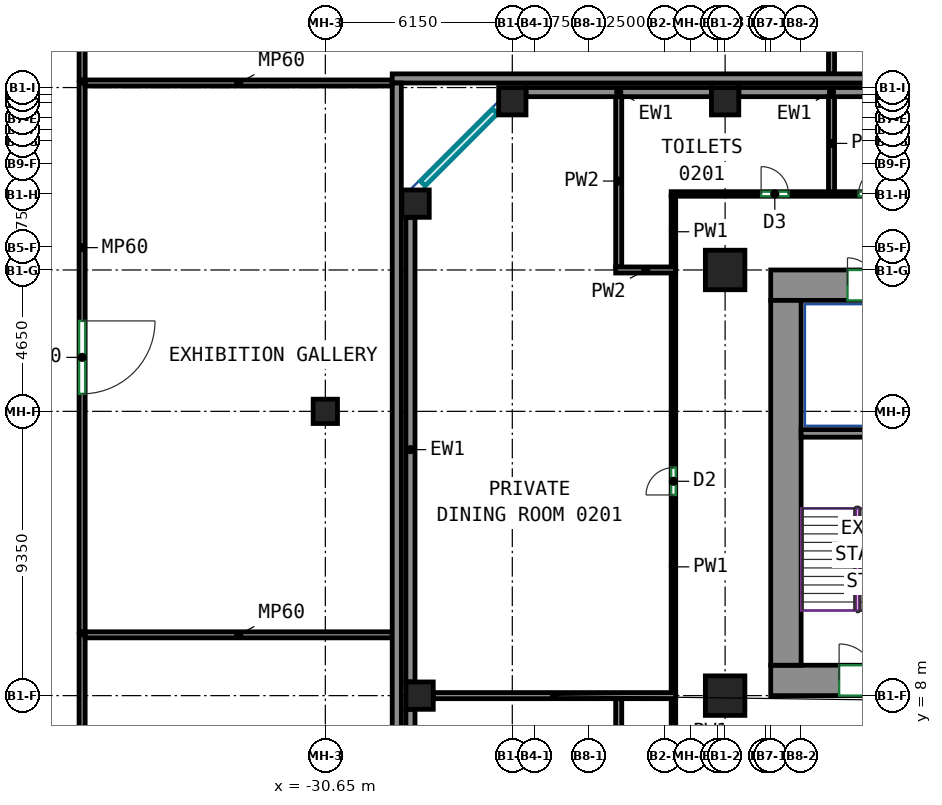
"""IFC4 building model, lengths in metres.
Left out: names, types, materials, properties, quantities, classifications, styles, units other than length and angle.
Written with IfcOpenShell. Run it as: python <this file> out.ifc"""

import sys

from ifc_helpers import new_model, si_unit, direction, frame, frame_2d, origin, origin_2d, place, context, subcontext, project, spatial, rectangle, extrude, source, transform, mapped, element, fill, save


model = new_model("IFC4")
c1 = context("Model", 3, precision=1e-05, world=origin(), true_north=direction((0.0, 1.0)))
c2 = subcontext(c1, "Body", "Model", "MODEL_VIEW")
j1 = project(units=[si_unit("LENGTHUNIT", "METRE"), si_unit("PLANEANGLEUNIT", "RADIAN")], contexts=[c1])
p1 = place(None, origin())
s1 = spatial("IfcSite", under=j1, at=p1, CompositionType="ELEMENT")
p2 = place(p1, origin())
s2 = spatial("IfcBuilding", under=s1, at=p2, CompositionType="ELEMENT")
p3 = place(p2, frame((0.0, 0.0, 13.5)))
s3 = spatial("IfcBuildingStorey", under=s2, at=p3, CompositionType="ELEMENT", Elevation=13.5)
m1 = source(origin(), c2, "Body", "SweptSolid", [
    extrude(rectangle(XDim=0.9, YDim=0.9, at=origin_2d()), origin(), (0.0, 0.0, 1.0), 4.1),
])
for number, where, z_axis, x_axis in (
    (1, (-27.682, 24.182, 0.0), (0.0, 0.0, 1.0), (1.0, 0.0, 0.0)),
    (2, (-27.55, 8.0, 0.0), (0.0, 0.0, 1.0), (1.0, 0.0, 0.0)),
    (3, (-24.5, 27.55, 0.0), (0.0, 0.0, 1.0), (1.0, 0.0, 0.0)),
):
    element("IfcColumn", number, at=place(p3, frame(where, z_axis=z_axis, x_axis=x_axis)), inside=s3, PredefinedType="COLUMN", context=c2, shape_type="MappedRepresentation", body=[
        mapped(m1, transform((0.0, 0.0, 0.0))),
    ])
m2 = source(origin(), c2, "Body", "SweptSolid", [
    extrude(rectangle(XDim=1.3, YDim=1.3, at=origin_2d()), origin(), (0.0, 0.0, 1.0), 4.1),
])
for number, where, z_axis, x_axis in (
    (4, (-17.5, 8.0, 0.0), (0.0, 0.0, 1.0), (1.0, 0.0, 0.0)),
    (5, (-17.5, 22.0, 0.0), (0.0, 0.0, 1.0), (1.0, 0.0, 0.0)),
):
    element("IfcColumn", number, at=place(p3, frame(where, z_axis=z_axis, x_axis=x_axis)), inside=s3, PredefinedType="COLUMN", context=c2, shape_type="MappedRepresentation", body=[
        mapped(m2, transform((0.0, 0.0, 0.0))),
    ])
p4 = place(p3, frame((-17.5, 27.55, 0.0), z_axis=(0.0, 0.0, 1.0), x_axis=(1.0, 0.0, 0.0)))
e6 = element("IfcColumn", 6, at=p4, inside=s3, PredefinedType="COLUMN", context=c2, shape_type="MappedRepresentation", body=[
    mapped(m1, transform((0.0, 0.0, 0.0))),
])
m3 = source(origin(), c2, "Body", "SweptSolid", [
    extrude(rectangle(XDim=5.63, YDim=1.0, at=frame_2d((2.815, 0.0))), origin(), (0.0, 0.0, 1.0), 4.1),
])
p5 = place(p3, frame((-16.0, 8.5, 0.0), z_axis=(0.0, 0.0, 1.0), x_axis=(1.0, 0.0, 0.0)))
e7 = element("IfcWall", 7, at=p5, inside=s3, PredefinedType="SHEAR", context=c2, shape_type="MappedRepresentation", body=[
    mapped(m3, transform((0.0, 0.0, 0.0))),
])
p6 = place(p5, frame((2.25, 0.0, 0.0)))
e8 = element("IfcOpeningElement", 8, at=p6, cuts=e7, PredefinedType="OPENING", context=c2, shape_type="SweptSolid", body=[
    extrude(rectangle(XDim=1.2, YDim=2.1, at=frame_2d((0.6, 1.05))), frame((0.0, 0.51, 0.0), z_axis=(0.0, -1.0, 0.0), x_axis=(1.0, 0.0, 0.0)), (0.0, 0.0, 1.0), 1.02),
])
m4 = source(origin(), c2, "Body", "SweptSolid", [
    extrude(rectangle(XDim=34.1, YDim=1.0, at=frame_2d((17.05, 0.0))), origin(), (0.0, 0.0, 1.0), 4.1),
])
p7 = place(p3, frame((-16.0, 21.5, 0.0), z_axis=(0.0, 0.0, 1.0), x_axis=(1.0, 0.0, 0.0)))
e9 = element("IfcWall", 9, at=p7, inside=s3, PredefinedType="SHEAR", context=c2, shape_type="MappedRepresentation", body=[
    mapped(m4, transform((0.0, 0.0, 0.0))),
])
p8 = place(p7, frame((6.108, 0.0, 0.0)))
e10 = element("IfcOpeningElement", 10, at=p8, cuts=e9, PredefinedType="OPENING", context=c2, shape_type="SweptSolid", body=[
    extrude(rectangle(XDim=0.9, YDim=2.1, at=frame_2d((0.45, 1.05))), frame((0.0, 0.51, 0.0), z_axis=(0.0, -1.0, 0.0), x_axis=(1.0, 0.0, 0.0)), (0.0, 0.0, 1.0), 1.02),
])
p9 = place(p7, frame((11.173, 0.0, 0.0)))
e11 = element("IfcOpeningElement", 11, at=p9, cuts=e9, PredefinedType="OPENING", context=c2, shape_type="SweptSolid", body=[
    extrude(rectangle(XDim=0.9, YDim=2.1, at=frame_2d((0.45, 1.05))), frame((0.0, 0.51, 0.0), z_axis=(0.0, -1.0, 0.0), x_axis=(1.0, 0.0, 0.0)), (0.0, 0.0, 1.0), 1.02),
])
p10 = place(p7, frame((16.238, 0.0, 0.0)))
e12 = element("IfcOpeningElement", 12, at=p10, cuts=e9, PredefinedType="OPENING", context=c2, shape_type="SweptSolid", body=[
    extrude(rectangle(XDim=0.9, YDim=2.1, at=frame_2d((0.45, 1.05))), frame((0.0, 0.51, 0.0), z_axis=(0.0, -1.0, 0.0), x_axis=(1.0, 0.0, 0.0)), (0.0, 0.0, 1.0), 1.02),
])
p11 = place(p7, frame((21.062, 0.0, 0.0)))
e13 = element("IfcOpeningElement", 13, at=p11, cuts=e9, PredefinedType="OPENING", context=c2, shape_type="SweptSolid", body=[
    extrude(rectangle(XDim=0.9, YDim=2.1, at=frame_2d((0.45, 1.05))), frame((0.0, 0.51, 0.0), z_axis=(0.0, -1.0, 0.0), x_axis=(1.0, 0.0, 0.0)), (0.0, 0.0, 1.0), 1.02),
])
p12 = place(p7, frame((26.489, 0.0, 0.0)))
e14 = element("IfcOpeningElement", 14, at=p12, cuts=e9, PredefinedType="OPENING", context=c2, shape_type="SweptSolid", body=[
    extrude(rectangle(XDim=0.9, YDim=2.1, at=frame_2d((0.45, 1.05))), frame((0.0, 0.51, 0.0), z_axis=(0.0, -1.0, 0.0), x_axis=(1.0, 0.0, 0.0)), (0.0, 0.0, 1.0), 1.02),
])
p13 = place(p7, frame((2.525, 0.0, 0.0)))
e15 = element("IfcOpeningElement", 15, at=p13, cuts=e9, PredefinedType="OPENING", context=c2, shape_type="SweptSolid", body=[
    extrude(rectangle(XDim=0.9, YDim=2.1, at=frame_2d((0.45, 1.05))), frame((0.0, 0.51, 0.0), z_axis=(0.0, -1.0, 0.0), x_axis=(1.0, 0.0, 0.0)), (0.0, 0.0, 1.0), 1.02),
])
p14 = place(p7, frame((30.675, 0.0, 0.0)))
e16 = element("IfcOpeningElement", 16, at=p14, cuts=e9, PredefinedType="OPENING", context=c2, shape_type="SweptSolid", body=[
    extrude(rectangle(XDim=0.9, YDim=2.1, at=frame_2d((0.45, 1.05))), frame((0.0, 0.51, 0.0), z_axis=(0.0, -1.0, 0.0), x_axis=(1.0, 0.0, 0.0)), (0.0, 0.0, 1.0), 1.02),
])
m5 = source(origin(), c2, "Body", "SweptSolid", [
    extrude(rectangle(XDim=12.0, YDim=1.0, at=frame_2d((6.0, 0.0))), origin(), (0.0, 0.0, 1.0), 4.1),
])
p15 = place(p3, frame((-15.5, 9.0, 0.0), z_axis=(0.0, 0.0, 1.0), x_axis=(0.0, 1.0, 0.0)))
e17 = element("IfcWall", 17, at=p15, inside=s3, PredefinedType="SHEAR", context=c2, shape_type="MappedRepresentation", body=[
    mapped(m5, transform((0.0, 0.0, 0.0))),
])
m6 = source(origin(), c2, "Body", "SweptSolid", [
    extrude(rectangle(XDim=3.7, YDim=0.25, at=frame_2d((1.85, 0.0))), origin(), (0.0, 0.0, 1.0), 4.1),
])
p16 = place(p3, frame((-15.0, 16.625, 0.0), z_axis=(0.0, 0.0, 1.0), x_axis=(1.0, 0.0, 0.0)))
e18 = element("IfcWall", 18, at=p16, inside=s3, PredefinedType="SHEAR", context=c2, shape_type="MappedRepresentation", body=[
    mapped(m6, transform((0.0, 0.0, 0.0))),
])
m7 = source(origin(), c2, "Body", "SweptSolid", [
    extrude(rectangle(XDim=0.8, YDim=0.8, at=origin_2d()), origin(), (0.0, 0.0, 1.0), 4.1),
])
p17 = place(p3, frame((-30.65, 17.35, 0.0), z_axis=(0.0, 0.0, 1.0), x_axis=(1.0, 0.0, 0.0)))
e19 = element("IfcColumn", 19, at=p17, inside=s3, PredefinedType="COLUMN", context=c2, shape_type="MappedRepresentation", body=[
    mapped(m7, transform((0.0, 0.0, 0.0))),
])
m8 = source(origin(), c2, "Body", "SweptSolid", [
    extrude(rectangle(XDim=6.1, YDim=0.3, at=frame_2d((3.05, 0.0))), origin(), (0.0, 0.0, 1.0), 4.1),
])
for number, where, z_axis, x_axis in (
    (20, (-10.95, 27.85, 0.0), (0.0, 0.0, 1.0), (-1.0, 0.0, 0.0)),
    (21, (-17.95, 27.85, 0.0), (0.0, 0.0, 1.0), (-1.0, 0.0, 0.0)),
):
    element("IfcWall", number, at=place(p3, frame(where, z_axis=z_axis, x_axis=x_axis)), inside=s3, PredefinedType="SOLIDWALL", context=c2, shape_type="MappedRepresentation", body=[
        mapped(m8, transform((0.0, 0.0, 0.0))),
    ])
m9 = source(origin(), c2, "Body", "SweptSolid", [
    extrude(rectangle(XDim=15.282, YDim=0.3, at=frame_2d((7.641, 0.0))), origin(), (0.0, 0.0, 1.0), 4.1),
])
p18 = place(p3, frame((-27.85, 23.732, 0.0), z_axis=(0.0, 0.0, 1.0), x_axis=(0.0, -1.0, 0.0)))
e22 = element("IfcWall", 22, at=p18, inside=s3, PredefinedType="SOLIDWALL", context=c2, shape_type="MappedRepresentation", body=[
    mapped(m9, transform((0.0, 0.0, 0.0))),
])
m10 = source(origin(), c2, "Body", "SweptSolid", [
    extrude(rectangle(XDim=8.1, YDim=0.3, at=frame_2d((4.05, 0.0))), origin(), (0.0, 0.0, 1.0), 4.1),
])
p19 = place(p3, frame((-27.85, 7.55, 0.0), z_axis=(0.0, 0.0, 1.0), x_axis=(0.0, -1.0, 0.0)))
e23 = element("IfcWall", 23, at=p19, inside=s3, PredefinedType="SOLIDWALL", context=c2, shape_type="MappedRepresentation", body=[
    mapped(m10, transform((0.0, 0.0, 0.0))),
])
m11 = source(origin(), c2, "Body", "SweptSolid", [
    extrude(rectangle(XDim=56.3, YDim=0.3, at=frame_2d((28.15, 0.0))), origin(), (0.0, 0.0, 1.0), 4.1),
])
p20 = place(p3, frame((27.85, 28.3, 0.0), z_axis=(0.0, 0.0, 1.0), x_axis=(-1.0, 0.0, 0.0)))
e24 = element("IfcWall", 24, at=p20, inside=s3, PredefinedType="SOLIDWALL", context=c2, shape_type="MappedRepresentation", body=[
    mapped(m11, transform((0.0, 0.0, 0.0))),
])
m12 = source(origin(), c2, "Body", "SweptSolid", [
    extrude(rectangle(XDim=56.3, YDim=0.3, at=frame_2d((28.15, 0.0))), origin(), (0.0, 0.0, 1.0), 4.1),
])
p21 = place(p3, frame((-28.3, 28.15, 0.0), z_axis=(0.0, 0.0, 1.0), x_axis=(0.0, -1.0, 0.0)))
e25 = element("IfcWall", 25, at=p21, inside=s3, PredefinedType="SOLIDWALL", context=c2, shape_type="MappedRepresentation", body=[
    mapped(m12, transform((0.0, 0.0, 0.0))),
])
p22 = place(p3, frame((-19.2, 8.09, 0.0), z_axis=(0.0, 0.0, 1.0), x_axis=(0.0, 1.0, 0.0)))
e26 = element("IfcWall", 26, at=p22, inside=s3, PredefinedType="PARTITIONING", context=c2, shape_type="SweptSolid", body=[
    extrude(rectangle(XDim=13.82, YDim=0.15, at=frame_2d((6.91, 0.0))), origin(), (0.0, 0.0, 1.0), 4.1),
])
p23 = place(p22, frame((6.51, 0.0, 0.0)))
e27 = element("IfcOpeningElement", 27, at=p23, cuts=e26, PredefinedType="OPENING", context=c2, shape_type="SweptSolid", body=[
    extrude(rectangle(XDim=0.9, YDim=2.1, at=frame_2d((0.45, 1.05))), frame((0.0, 0.085, 0.0), z_axis=(0.0, -1.0, 0.0), x_axis=(1.0, 0.0, 0.0)), (0.0, 0.0, 1.0), 0.17),
])
p24 = place(p3, frame((-19.2, 22.09, 0.0), z_axis=(0.0, 0.0, 1.0), x_axis=(0.0, 1.0, 0.0)))
e28 = element("IfcWall", 28, at=p24, inside=s3, PredefinedType="PARTITIONING", context=c2, shape_type="SweptSolid", body=[
    extrude(rectangle(XDim=2.335, YDim=0.15, at=frame_2d((1.167, 0.0))), origin(), (0.0, 0.0, 1.0), 4.1),
])
p25 = place(p3, frame((-19.275, 24.5, 0.0), z_axis=(0.0, 0.0, 1.0), x_axis=(1.0, 0.0, 0.0)))
e29 = element("IfcWall", 29, at=p25, inside=s3, PredefinedType="PARTITIONING", context=c2, shape_type="SweptSolid", body=[
    extrude(rectangle(XDim=40.35, YDim=0.15, at=frame_2d((20.175, 0.0))), origin(), (0.0, 0.0, 1.0), 3.45),
])
p26 = place(p25, frame((2.959, 0.0, 0.0)))
e30 = element("IfcOpeningElement", 30, at=p26, cuts=e29, PredefinedType="OPENING", context=c2, shape_type="SweptSolid", body=[
    extrude(rectangle(XDim=0.9, YDim=2.1, at=frame_2d((0.45, 1.05))), frame((0.0, 0.085, 0.0), z_axis=(0.0, -1.0, 0.0), x_axis=(1.0, 0.0, 0.0)), (0.0, 0.0, 1.0), 0.17),
])
p27 = place(p25, frame((6.167, 0.0, 0.0)))
e31 = element("IfcOpeningElement", 31, at=p27, cuts=e29, PredefinedType="OPENING", context=c2, shape_type="SweptSolid", body=[
    extrude(rectangle(XDim=0.9, YDim=2.1, at=frame_2d((0.45, 1.05))), frame((0.0, 0.085, 0.0), z_axis=(0.0, -1.0, 0.0), x_axis=(1.0, 0.0, 0.0)), (0.0, 0.0, 1.0), 0.17),
])
p28 = place(p25, frame((16.969, 0.0, 0.0)))
e32 = element("IfcOpeningElement", 32, at=p28, cuts=e29, PredefinedType="OPENING", context=c2, shape_type="SweptSolid", body=[
    extrude(rectangle(XDim=0.9, YDim=2.1, at=frame_2d((0.45, 1.05))), frame((0.0, 0.085, 0.0), z_axis=(0.0, -1.0, 0.0), x_axis=(1.0, 0.0, 0.0)), (0.0, 0.0, 1.0), 0.17),
])
p29 = place(p25, frame((24.268, 0.0, 0.0)))
e33 = element("IfcOpeningElement", 33, at=p29, cuts=e29, PredefinedType="OPENING", context=c2, shape_type="SweptSolid", body=[
    extrude(rectangle(XDim=0.9, YDim=2.1, at=frame_2d((0.45, 1.05))), frame((0.0, 0.085, 0.0), z_axis=(0.0, -1.0, 0.0), x_axis=(1.0, 0.0, 0.0)), (0.0, 0.0, 1.0), 0.17),
])
p30 = place(p25, frame((36.315, 0.0, 0.0)))
e34 = element("IfcOpeningElement", 34, at=p30, cuts=e29, PredefinedType="OPENING", context=c2, shape_type="SweptSolid", body=[
    extrude(rectangle(XDim=1.8, YDim=2.1, at=frame_2d((0.9, 1.05))), frame((0.0, 0.085, 0.0), z_axis=(0.0, -1.0, 0.0), x_axis=(1.0, 0.0, 0.0)), (0.0, 0.0, 1.0), 0.17),
])
p31 = place(p3, frame((-19.2, 5.675, 0.0), z_axis=(0.0, 0.0, 1.0), x_axis=(0.0, 1.0, 0.0)))
e35 = element("IfcWall", 35, at=p31, inside=s3, PredefinedType="PARTITIONING", context=c2, shape_type="SweptSolid", body=[
    extrude(rectangle(XDim=2.235, YDim=0.15, at=frame_2d((1.117, 0.0))), origin(), (0.0, 0.0, 1.0), 4.1),
])
p32 = place(p3, frame((-27.1, 8.0, 0.0), z_axis=(0.0, 0.0, 1.0), x_axis=(1.0, 0.0, 0.0)))
e36 = element("IfcWall", 36, at=p32, inside=s3, PredefinedType="PARTITIONING", context=c2, shape_type="SweptSolid", body=[
    extrude(rectangle(XDim=7.974, YDim=0.2, at=frame_2d((3.987, 0.0))), origin(), (0.0, 0.0, 1.0), 3.45),
])
p33 = place(p3, frame((-21.0, -0.898, 0.0), z_axis=(0.0, 0.0, 1.0), x_axis=(0.0, 1.0, 0.0)))
e37 = element("IfcWall", 37, at=p33, inside=s3, PredefinedType="PARTITIONING", context=c2, shape_type="SweptSolid", body=[
    extrude(rectangle(XDim=8.798, YDim=0.2, at=frame_2d((4.399, 0.0))), origin(), (0.0, 0.0, 1.0), 4.1),
])
p34 = place(p3, frame((-21.0, 22.1, 0.0), z_axis=(0.0, 0.0, 1.0), x_axis=(0.0, 1.0, 0.0)))
e38 = element("IfcWall", 38, at=p34, inside=s3, PredefinedType="PARTITIONING", context=c2, shape_type="SweptSolid", body=[
    extrude(rectangle(XDim=5.65, YDim=0.2, at=frame_2d((2.825, 0.0))), origin(), (0.0, 0.0, 1.0), 4.1),
])
p35 = place(p3, frame((-19.126, 22.0, 0.0), z_axis=(0.0, 0.0, 1.0), x_axis=(-1.0, 0.0, 0.0)))
e39 = element("IfcWall", 39, at=p35, inside=s3, PredefinedType="PARTITIONING", context=c2, shape_type="SweptSolid", body=[
    extrude(rectangle(XDim=1.974, YDim=0.2, at=frame_2d((0.987, 0.0))), origin(), (0.0, 0.0, 1.0), 4.1),
])
p36 = place(p3, frame((-14.0, 24.576, 0.0), z_axis=(0.0, 0.0, 1.0), x_axis=(0.0, 1.0, 0.0)))
e40 = element("IfcWall", 40, at=p36, inside=s3, PredefinedType="PARTITIONING", context=c2, shape_type="SweptSolid", body=[
    extrude(rectangle(XDim=3.174, YDim=0.2, at=frame_2d((1.587, 0.0))), origin(), (0.0, 0.0, 1.0), 4.1),
])
m13 = source(origin(), c2, "Body", "SweptSolid", [
    extrude(rectangle(XDim=12.55, YDim=0.2, at=frame_2d((6.275, 0.0))), origin(), (0.0, 0.0, 1.0), 3.3),
])
p37 = place(p3, frame((-38.65, 10.0, 0.0), z_axis=(0.0, 0.0, 1.0), x_axis=(0.0, -1.0, 0.0)))
e41 = element("IfcWall", 41, at=p37, inside=s3, PredefinedType="PARTITIONING", context=c2, shape_type="MappedRepresentation", body=[
    mapped(m13, transform((0.0, 0.0, 0.0))),
])
p38 = place(p37, frame((5.775, 0.0, 0.0)))
e42 = element("IfcOpeningElement", 42, at=p38, cuts=e41, PredefinedType="OPENING", context=c2, shape_type="SweptSolid", body=[
    extrude(rectangle(XDim=1.0, YDim=2.1, at=frame_2d((0.5, 1.05))), frame((0.0, 0.11, 0.0), z_axis=(0.0, -1.0, 0.0), x_axis=(1.0, 0.0, 0.0)), (0.0, 0.0, 1.0), 0.22),
])
m14 = source(origin(), c2, "Body", "SweptSolid", [
    extrude(rectangle(XDim=10.1, YDim=0.2, at=frame_2d((5.05, 0.0))), origin(), (0.0, 0.0, 1.0), 3.3),
])
p39 = place(p3, frame((-38.55, 10.0, 0.0), z_axis=(0.0, 0.0, 1.0), x_axis=(1.0, 0.0, 0.0)))
e43 = element("IfcWall", 43, at=p39, inside=s3, PredefinedType="PARTITIONING", context=c2, shape_type="MappedRepresentation", body=[
    mapped(m14, transform((0.0, 0.0, 0.0))),
])
m15 = source(origin(), c2, "Body", "SweptSolid", [
    extrude(rectangle(XDim=18.05, YDim=0.2, at=frame_2d((9.025, 0.0))), origin(), (0.0, 0.0, 1.0), 3.3),
])
p40 = place(p3, frame((-38.65, 28.15, 0.0), z_axis=(0.0, 0.0, 1.0), x_axis=(0.0, -1.0, 0.0)))
e44 = element("IfcWall", 44, at=p40, inside=s3, PredefinedType="PARTITIONING", context=c2, shape_type="MappedRepresentation", body=[
    mapped(m15, transform((0.0, 0.0, 0.0))),
])
p41 = place(p40, frame((7.825, 0.0, 0.0)))
e45 = element("IfcOpeningElement", 45, at=p41, cuts=e44, PredefinedType="OPENING", context=c2, shape_type="SweptSolid", body=[
    extrude(rectangle(XDim=2.4, YDim=2.4, at=frame_2d((1.2, 1.2))), frame((0.0, 0.11, 0.0), z_axis=(0.0, -1.0, 0.0), x_axis=(1.0, 0.0, 0.0)), (0.0, 0.0, 1.0), 0.22),
])
p42 = place(p3, frame((-38.55, 28.15, 0.0), z_axis=(0.0, 0.0, 1.0), x_axis=(1.0, 0.0, 0.0)))
e46 = element("IfcWall", 46, at=p42, inside=s3, PredefinedType="PARTITIONING", context=c2, shape_type="MappedRepresentation", body=[
    mapped(m14, transform((0.0, 0.0, 0.0))),
])
m16 = source(origin(), c2, "Body", "SweptSolid", [
    extrude(rectangle(XDim=10.4, YDim=0.2, at=frame_2d((5.2, 0.0))), origin(), (0.0, 0.0, 1.0), 3.3),
])
p43 = place(p3, frame((-38.65, 38.65, 0.0), z_axis=(0.0, 0.0, 1.0), x_axis=(0.0, -1.0, 0.0)))
e47 = element("IfcWall", 47, at=p43, inside=s3, PredefinedType="PARTITIONING", context=c2, shape_type="MappedRepresentation", body=[
    mapped(m16, transform((0.0, 0.0, 0.0))),
])
p44 = place(p3, frame((-14.0, 38.55, 0.0), z_axis=(0.0, 0.0, 1.0), x_axis=(0.0, -1.0, 0.0)))
e48 = element("IfcWall", 48, at=p44, inside=s3, PredefinedType="PARTITIONING", context=c2, shape_type="MappedRepresentation", body=[
    mapped(m14, transform((0.0, 0.0, 0.0))),
])
p45 = place(p13, origin())
e49 = element("IfcDoor", 49, at=p45, inside=s3, OperationType="SINGLE_SWING_LEFT", PredefinedType="DOOR", context=c2, shape_type="SweptSolid", body=[
    extrude(rectangle(XDim=0.9, YDim=2.1, at=frame_2d((0.45, 1.05))), frame((0.0, -0.355, 0.0), z_axis=(0.0, -1.0, 0.0), x_axis=(1.0, 0.0, 0.0)), (0.0, 0.0, 1.0), 0.05),
])
fill(e15, e49)
p46 = place(p6, origin())
e50 = element("IfcDoor", 50, at=p46, inside=s3, OperationType="DOUBLE_DOOR_SINGLE_SWING", PredefinedType="DOOR", context=c2, shape_type="SweptSolid", body=[
    extrude(rectangle(XDim=1.2, YDim=2.1, at=frame_2d((0.6, 1.05))), frame((0.0, 0.405, 0.0), z_axis=(0.0, -1.0, 0.0), x_axis=(1.0, 0.0, 0.0)), (0.0, 0.0, 1.0), 0.05),
])
fill(e8, e50)
p47 = place(p23, origin())
e51 = element("IfcDoor", 51, at=p47, inside=s3, OperationType="SINGLE_SWING_LEFT", PredefinedType="DOOR", context=c2, shape_type="SweptSolid", body=[
    extrude(rectangle(XDim=0.9, YDim=2.1, at=frame_2d((0.45, 1.05))), frame((0.0, 0.025, 0.0), z_axis=(0.0, -1.0, 0.0), x_axis=(1.0, 0.0, 0.0)), (0.0, 0.0, 1.0), 0.05),
])
fill(e27, e51)
p48 = place(p26, origin())
e52 = element("IfcDoor", 52, at=p48, inside=s3, OperationType="SINGLE_SWING_LEFT", PredefinedType="DOOR", context=c2, shape_type="SweptSolid", body=[
    extrude(rectangle(XDim=0.9, YDim=2.1, at=frame_2d((0.45, 1.05))), frame((0.0, 0.025, 0.0), z_axis=(0.0, -1.0, 0.0), x_axis=(1.0, 0.0, 0.0)), (0.0, 0.0, 1.0), 0.05),
])
fill(e30, e52)
p49 = place(p27, origin())
e53 = element("IfcDoor", 53, at=p49, inside=s3, OperationType="SINGLE_SWING_RIGHT", PredefinedType="DOOR", context=c2, shape_type="SweptSolid", body=[
    extrude(rectangle(XDim=0.9, YDim=2.1, at=frame_2d((0.45, 1.05))), frame((0.0, 0.025, 0.0), z_axis=(0.0, -1.0, 0.0), x_axis=(1.0, 0.0, 0.0)), (0.0, 0.0, 1.0), 0.05),
])
fill(e31, e53)
p50 = place(p41, origin())
e54 = element("IfcDoor", 54, at=p50, inside=s3, OperationType="DOUBLE_DOOR_SINGLE_SWING", PredefinedType="DOOR", context=c2, shape_type="SweptSolid", body=[
    extrude(rectangle(XDim=2.4, YDim=2.4, at=frame_2d((1.2, 1.2))), frame((0.0, 0.025, 0.0), z_axis=(0.0, -1.0, 0.0), x_axis=(1.0, 0.0, 0.0)), (0.0, 0.0, 1.0), 0.05),
])
fill(e45, e54)
save(model, sys.argv[1])
